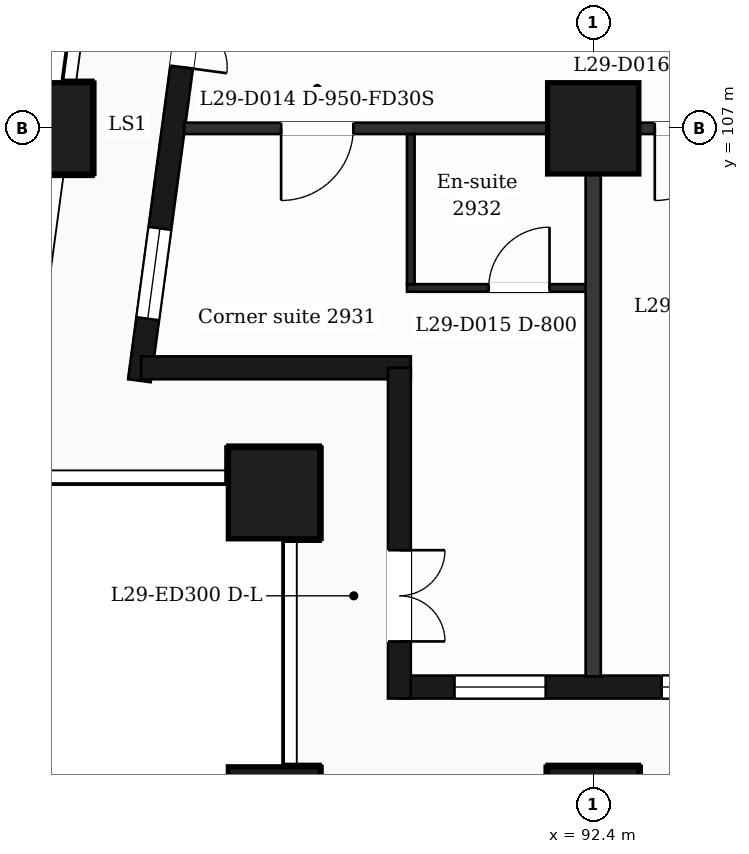
"""IFC4 building model, lengths in metres.
Left out: names, types, materials, properties, quantities, classifications, styles, units other than length and angle.
Written with IfcOpenShell. Run it as: python <this file> out.ifc"""

import sys

from ifc_helpers import new_model, si_unit, direction, frame, frame_2d, origin, origin_2d, place, context, subcontext, project, spatial, rectangle, extrude, element, fill, save


model = new_model("IFC4")
c1 = context("Model", 3, precision=1e-05, world=origin(), true_north=direction((0.0, 1.0)))
c2 = subcontext(c1, "Body", "Model", "MODEL_VIEW")
j1 = project(units=[si_unit("LENGTHUNIT", "METRE"), si_unit("PLANEANGLEUNIT", "RADIAN")], contexts=[c1])
p1 = place(None, origin())
s1 = spatial("IfcSite", under=j1, at=p1, CompositionType="ELEMENT")
p2 = place(p1, origin())
s2 = spatial("IfcBuilding", under=s1, at=p2, CompositionType="ELEMENT")
p3 = place(p2, frame((0.0, 0.0, 124.3)))
s3 = spatial("IfcBuildingStorey", under=s2, at=p3, CompositionType="ELEMENT", Elevation=124.3)
for number, where, z_axis, x_axis in (
    (1, (92.4, 98.0, 0.0), (0.0, 0.0, 1.0), (1.0, 0.0, 0.0)),
    (2, (88.2, 98.0, 0.0), (0.0, 0.0, 1.0), (1.0, 0.0, 0.0)),
    (3, (88.2, 102.2, 0.0), (0.0, 0.0, 1.0), (1.0, 0.0, 0.0)),
    (4, (92.4, 107.0, 0.0), (0.0, 0.0, 1.0), (1.0, 0.0, 0.0)),
    (5, (85.211, 107.0, 0.0), (0.0, 0.0, 1.0), (1.0, 0.0, 0.0)),
):
    element("IfcColumn", number, at=place(p3, frame(where, z_axis=z_axis, x_axis=x_axis)), inside=s3, PredefinedType="COLUMN", context=c2, shape_type="SweptSolid", body=[
        extrude(rectangle(XDim=1.2, YDim=1.2, at=origin_2d()), origin(), (0.0, 0.0, 1.0), 3.7),
    ])
p4 = place(p3, frame((89.85, 99.65, 0.0), z_axis=(0.0, 0.0, 1.0), x_axis=(1.0, 0.0, 0.0)))
e6 = element("IfcWall", 6, at=p4, inside=s3, PredefinedType="SOLIDWALL", context=c2, shape_type="SweptSolid", body=[
    extrude(rectangle(XDim=47.25, YDim=0.3, at=frame_2d((23.625, 0.0))), origin(), (0.0, 0.0, 1.0), 3.38),
])
p5 = place(p4, frame((0.725, 0.0, 0.9)))
e7 = element("IfcOpeningElement", 7, at=p5, cuts=e6, PredefinedType="OPENING", context=c2, shape_type="SweptSolid", body=[
    extrude(rectangle(XDim=1.2, YDim=2.1, at=frame_2d((0.6, 1.05))), frame((0.0, 0.16, 0.0), z_axis=(0.0, -1.0, 0.0), x_axis=(1.0, 0.0, 0.0)), (0.0, 0.0, 1.0), 0.32),
])
p6 = place(p4, frame((3.45, 0.0, 0.9)))
e8 = element("IfcOpeningElement", 8, at=p6, cuts=e6, PredefinedType="OPENING", context=c2, shape_type="SweptSolid", body=[
    extrude(rectangle(XDim=2.4, YDim=2.1, at=frame_2d((1.2, 1.05))), frame((0.0, 0.16, 0.0), z_axis=(0.0, -1.0, 0.0), x_axis=(1.0, 0.0, 0.0)), (0.0, 0.0, 1.0), 0.32),
])
p7 = place(p4, frame((7.65, 0.0, 0.9)))
e9 = element("IfcOpeningElement", 9, at=p7, cuts=e6, PredefinedType="OPENING", context=c2, shape_type="SweptSolid", body=[
    extrude(rectangle(XDim=2.4, YDim=2.1, at=frame_2d((1.2, 1.05))), frame((0.0, 0.16, 0.0), z_axis=(0.0, -1.0, 0.0), x_axis=(1.0, 0.0, 0.0)), (0.0, 0.0, 1.0), 0.32),
])
p8 = place(p4, frame((11.85, 0.0, 0.9)))
e10 = element("IfcOpeningElement", 10, at=p8, cuts=e6, PredefinedType="OPENING", context=c2, shape_type="SweptSolid", body=[
    extrude(rectangle(XDim=2.4, YDim=2.1, at=frame_2d((1.2, 1.05))), frame((0.0, 0.16, 0.0), z_axis=(0.0, -1.0, 0.0), x_axis=(1.0, 0.0, 0.0)), (0.0, 0.0, 1.0), 0.32),
])
p9 = place(p4, frame((16.05, 0.0, 0.9)))
e11 = element("IfcOpeningElement", 11, at=p9, cuts=e6, PredefinedType="OPENING", context=c2, shape_type="SweptSolid", body=[
    extrude(rectangle(XDim=2.4, YDim=2.1, at=frame_2d((1.2, 1.05))), frame((0.0, 0.16, 0.0), z_axis=(0.0, -1.0, 0.0), x_axis=(1.0, 0.0, 0.0)), (0.0, 0.0, 1.0), 0.32),
])
p10 = place(p4, frame((20.25, 0.0, 0.9)))
e12 = element("IfcOpeningElement", 12, at=p10, cuts=e6, PredefinedType="OPENING", context=c2, shape_type="SweptSolid", body=[
    extrude(rectangle(XDim=2.4, YDim=2.1, at=frame_2d((1.2, 1.05))), frame((0.0, 0.16, 0.0), z_axis=(0.0, -1.0, 0.0), x_axis=(1.0, 0.0, 0.0)), (0.0, 0.0, 1.0), 0.32),
])
p11 = place(p4, frame((25.05, 0.0, 0.9)))
e13 = element("IfcOpeningElement", 13, at=p11, cuts=e6, PredefinedType="OPENING", context=c2, shape_type="SweptSolid", body=[
    extrude(rectangle(XDim=1.2, YDim=2.1, at=frame_2d((0.6, 1.05))), frame((0.0, 0.16, 0.0), z_axis=(0.0, -1.0, 0.0), x_axis=(1.0, 0.0, 0.0)), (0.0, 0.0, 1.0), 0.32),
])
p12 = place(p4, frame((29.25, 0.0, 0.9)))
e14 = element("IfcOpeningElement", 14, at=p12, cuts=e6, PredefinedType="OPENING", context=c2, shape_type="SweptSolid", body=[
    extrude(rectangle(XDim=1.2, YDim=2.1, at=frame_2d((0.6, 1.05))), frame((0.0, 0.16, 0.0), z_axis=(0.0, -1.0, 0.0), x_axis=(1.0, 0.0, 0.0)), (0.0, 0.0, 1.0), 0.32),
])
p13 = place(p4, frame((32.55, 0.0, 0.0)))
e15 = element("IfcOpeningElement", 15, at=p13, cuts=e6, PredefinedType="OPENING", context=c2, shape_type="SweptSolid", body=[
    extrude(rectangle(XDim=1.2, YDim=2.4, at=frame_2d((0.6, 1.2))), frame((0.0, 0.16, 0.0), z_axis=(0.0, -1.0, 0.0), x_axis=(1.0, 0.0, 0.0)), (0.0, 0.0, 1.0), 0.32),
])
p14 = place(p4, frame((34.35, 0.0, 0.9)))
e16 = element("IfcOpeningElement", 16, at=p14, cuts=e6, PredefinedType="OPENING", context=c2, shape_type="SweptSolid", body=[
    extrude(rectangle(XDim=1.2, YDim=2.1, at=frame_2d((0.6, 1.05))), frame((0.0, 0.16, 0.0), z_axis=(0.0, -1.0, 0.0), x_axis=(1.0, 0.0, 0.0)), (0.0, 0.0, 1.0), 0.32),
])
p15 = place(p4, frame((37.05, 0.0, 0.9)))
e17 = element("IfcOpeningElement", 17, at=p15, cuts=e6, PredefinedType="OPENING", context=c2, shape_type="SweptSolid", body=[
    extrude(rectangle(XDim=2.4, YDim=2.1, at=frame_2d((1.2, 1.05))), frame((0.0, 0.16, 0.0), z_axis=(0.0, -1.0, 0.0), x_axis=(1.0, 0.0, 0.0)), (0.0, 0.0, 1.0), 0.32),
])
p16 = place(p4, frame((40.95, 0.0, 0.0)))
e18 = element("IfcOpeningElement", 18, at=p16, cuts=e6, PredefinedType="OPENING", context=c2, shape_type="SweptSolid", body=[
    extrude(rectangle(XDim=1.2, YDim=2.4, at=frame_2d((0.6, 1.2))), frame((0.0, 0.16, 0.0), z_axis=(0.0, -1.0, 0.0), x_axis=(1.0, 0.0, 0.0)), (0.0, 0.0, 1.0), 0.32),
])
p17 = place(p4, frame((42.75, 0.0, 0.9)))
e19 = element("IfcOpeningElement", 19, at=p17, cuts=e6, PredefinedType="OPENING", context=c2, shape_type="SweptSolid", body=[
    extrude(rectangle(XDim=1.2, YDim=2.1, at=frame_2d((0.6, 1.05))), frame((0.0, 0.16, 0.0), z_axis=(0.0, -1.0, 0.0), x_axis=(1.0, 0.0, 0.0)), (0.0, 0.0, 1.0), 0.32),
])
p18 = place(p4, frame((45.25, 0.0, 0.9)))
e20 = element("IfcOpeningElement", 20, at=p18, cuts=e6, PredefinedType="OPENING", context=c2, shape_type="SweptSolid", body=[
    extrude(rectangle(XDim=1.2, YDim=2.1, at=frame_2d((0.6, 1.05))), frame((0.0, 0.16, 0.0), z_axis=(0.0, -1.0, 0.0), x_axis=(1.0, 0.0, 0.0)), (0.0, 0.0, 1.0), 0.32),
])
p19 = place(p3, frame((87.334, 110.4, 0.0), z_axis=(0.0, 0.0, 1.0), x_axis=(-0.133437175554, -0.991057273915, 0.0)))
e21 = element("IfcWall", 21, at=p19, inside=s3, PredefinedType="SOLIDWALL", context=c2, shape_type="SweptSolid", body=[
    extrude(rectangle(XDim=6.781, YDim=0.3, at=frame_2d((3.39, 0.0))), origin(), (0.0, 0.0, 1.0), 3.38),
])
p20 = place(p19, frame((1.418, 0.0, 0.0)))
e22 = element("IfcOpeningElement", 22, at=p20, cuts=e21, PredefinedType="OPENING", context=c2, shape_type="SweptSolid", body=[
    extrude(rectangle(XDim=1.2, YDim=2.4, at=frame_2d((0.6, 1.2))), frame((0.0, 0.16, 0.0), z_axis=(0.0, -1.0, 0.0), x_axis=(1.0, 0.0, 0.0)), (0.0, 0.0, 1.0), 0.32),
])
p21 = place(p19, frame((4.758, 0.0, 0.9)))
e23 = element("IfcOpeningElement", 23, at=p21, cuts=e21, PredefinedType="OPENING", context=c2, shape_type="SweptSolid", body=[
    extrude(rectangle(XDim=1.2, YDim=2.1, at=frame_2d((0.6, 1.05))), frame((0.0, 0.16, 0.0), z_axis=(0.0, -1.0, 0.0), x_axis=(1.0, 0.0, 0.0)), (0.0, 0.0, 1.0), 0.32),
])
p22 = place(p3, frame((86.452, 103.85, 0.0), z_axis=(0.0, 0.0, 1.0), x_axis=(1.0, 0.0, 0.0)))
e24 = element("IfcWall", 24, at=p22, inside=s3, PredefinedType="SOLIDWALL", context=c2, shape_type="SweptSolid", body=[
    extrude(rectangle(XDim=3.548, YDim=0.3, at=frame_2d((1.774, 0.0))), origin(), (0.0, 0.0, 1.0), 3.38),
])
p23 = place(p3, frame((89.85, 103.85, 0.0), z_axis=(0.0, 0.0, 1.0), x_axis=(0.0, -1.0, 0.0)))
e25 = element("IfcWall", 25, at=p23, inside=s3, PredefinedType="SOLIDWALL", context=c2, shape_type="SweptSolid", body=[
    extrude(rectangle(XDim=4.35, YDim=0.3, at=frame_2d((2.175, 0.0))), origin(), (0.0, 0.0, 1.0), 3.38),
])
p24 = place(p23, frame((2.4, 0.0, 0.0)))
e26 = element("IfcOpeningElement", 26, at=p24, cuts=e25, PredefinedType="OPENING", context=c2, shape_type="SweptSolid", body=[
    extrude(rectangle(XDim=1.2, YDim=2.4, at=frame_2d((0.6, 1.2))), frame((0.0, 0.16, 0.0), z_axis=(0.0, -1.0, 0.0), x_axis=(1.0, 0.0, 0.0)), (0.0, 0.0, 1.0), 0.32),
])
p25 = place(p3, frame((89.95, 104.9, 0.0), z_axis=(0.0, 0.0, 1.0), x_axis=(1.0, 0.0, 0.0)))
e27 = element("IfcWall", 27, at=p25, inside=s3, PredefinedType="PARTITIONING", context=c2, shape_type="SweptSolid", body=[
    extrude(rectangle(XDim=2.45, YDim=0.1, at=frame_2d((1.225, 0.0))), origin(), (0.0, 0.0, 1.0), 3.38),
])
p26 = place(p25, frame((1.075, 0.0, 0.0)))
e28 = element("IfcOpeningElement", 28, at=p26, cuts=e27, PredefinedType="OPENING", context=c2, shape_type="SweptSolid", body=[
    extrude(rectangle(XDim=0.8, YDim=2.1, at=frame_2d((0.4, 1.05))), frame((0.0, 0.06, 0.0), z_axis=(0.0, -1.0, 0.0), x_axis=(1.0, 0.0, 0.0)), (0.0, 0.0, 1.0), 0.12),
])
p27 = place(p3, frame((87.018, 107.0, 0.0), z_axis=(0.0, 0.0, 1.0), x_axis=(1.0, 0.0, 0.0)))
e29 = element("IfcWall", 29, at=p27, inside=s3, PredefinedType="PARTITIONING", context=c2, shape_type="SweptSolid", body=[
    extrude(rectangle(XDim=52.765, YDim=0.15, at=frame_2d((26.382, 0.0))), origin(), (0.0, 0.0, 1.0), 3.38),
])
p28 = place(p27, frame((1.276, 0.0, 0.0)))
e30 = element("IfcOpeningElement", 30, at=p28, cuts=e29, PredefinedType="OPENING", context=c2, shape_type="SweptSolid", body=[
    extrude(rectangle(XDim=0.95, YDim=2.1, at=frame_2d((0.475, 1.05))), frame((0.0, 0.085, 0.0), z_axis=(0.0, -1.0, 0.0), x_axis=(1.0, 0.0, 0.0)), (0.0, 0.0, 1.0), 0.17),
])
p29 = place(p27, frame((6.192, 0.0, 0.0)))
e31 = element("IfcOpeningElement", 31, at=p29, cuts=e29, PredefinedType="OPENING", context=c2, shape_type="SweptSolid", body=[
    extrude(rectangle(XDim=0.95, YDim=2.1, at=frame_2d((0.475, 1.05))), frame((0.0, 0.085, 0.0), z_axis=(0.0, -1.0, 0.0), x_axis=(1.0, 0.0, 0.0)), (0.0, 0.0, 1.0), 0.17),
])
p30 = place(p27, frame((11.982, 0.0, 0.0)))
e32 = element("IfcOpeningElement", 32, at=p30, cuts=e29, PredefinedType="OPENING", context=c2, shape_type="SweptSolid", body=[
    extrude(rectangle(XDim=1.0, YDim=2.1, at=frame_2d((0.5, 1.05))), frame((0.0, 0.085, 0.0), z_axis=(0.0, -1.0, 0.0), x_axis=(1.0, 0.0, 0.0)), (0.0, 0.0, 1.0), 0.17),
])
p31 = place(p27, frame((14.582, 0.0, 0.0)))
e33 = element("IfcOpeningElement", 33, at=p31, cuts=e29, PredefinedType="OPENING", context=c2, shape_type="SweptSolid", body=[
    extrude(rectangle(XDim=0.95, YDim=2.1, at=frame_2d((0.475, 1.05))), frame((0.0, 0.085, 0.0), z_axis=(0.0, -1.0, 0.0), x_axis=(1.0, 0.0, 0.0)), (0.0, 0.0, 1.0), 0.17),
])
p32 = place(p27, frame((18.257, 0.0, 0.0)))
e34 = element("IfcOpeningElement", 34, at=p32, cuts=e29, PredefinedType="OPENING", context=c2, shape_type="SweptSolid", body=[
    extrude(rectangle(XDim=0.95, YDim=2.1, at=frame_2d((0.475, 1.05))), frame((0.0, 0.085, 0.0), z_axis=(0.0, -1.0, 0.0), x_axis=(1.0, 0.0, 0.0)), (0.0, 0.0, 1.0), 0.17),
])
p33 = place(p27, frame((22.992, 0.0, 0.0)))
e35 = element("IfcOpeningElement", 35, at=p33, cuts=e29, PredefinedType="OPENING", context=c2, shape_type="SweptSolid", body=[
    extrude(rectangle(XDim=0.95, YDim=2.1, at=frame_2d((0.475, 1.05))), frame((0.0, 0.085, 0.0), z_axis=(0.0, -1.0, 0.0), x_axis=(1.0, 0.0, 0.0)), (0.0, 0.0, 1.0), 0.17),
])
p34 = place(p27, frame((26.632, 0.0, 0.0)))
e36 = element("IfcOpeningElement", 36, at=p34, cuts=e29, PredefinedType="OPENING", context=c2, shape_type="SweptSolid", body=[
    extrude(rectangle(XDim=1.0, YDim=2.1, at=frame_2d((0.5, 1.05))), frame((0.0, 0.085, 0.0), z_axis=(0.0, -1.0, 0.0), x_axis=(1.0, 0.0, 0.0)), (0.0, 0.0, 1.0), 0.17),
])
p35 = place(p27, frame((33.557, 0.0, 0.0)))
e37 = element("IfcOpeningElement", 37, at=p35, cuts=e29, PredefinedType="OPENING", context=c2, shape_type="SweptSolid", body=[
    extrude(rectangle(XDim=0.95, YDim=2.1, at=frame_2d((0.475, 1.05))), frame((0.0, 0.085, 0.0), z_axis=(0.0, -1.0, 0.0), x_axis=(1.0, 0.0, 0.0)), (0.0, 0.0, 1.0), 0.17),
])
p36 = place(p27, frame((37.182, 0.0, 0.0)))
e38 = element("IfcOpeningElement", 38, at=p36, cuts=e29, PredefinedType="OPENING", context=c2, shape_type="SweptSolid", body=[
    extrude(rectangle(XDim=0.95, YDim=2.1, at=frame_2d((0.475, 1.05))), frame((0.0, 0.085, 0.0), z_axis=(0.0, -1.0, 0.0), x_axis=(1.0, 0.0, 0.0)), (0.0, 0.0, 1.0), 0.17),
])
p37 = place(p27, frame((41.957, 0.0, 0.0)))
e39 = element("IfcOpeningElement", 39, at=p37, cuts=e29, PredefinedType="OPENING", context=c2, shape_type="SweptSolid", body=[
    extrude(rectangle(XDim=0.95, YDim=2.1, at=frame_2d((0.475, 1.05))), frame((0.0, 0.085, 0.0), z_axis=(0.0, -1.0, 0.0), x_axis=(1.0, 0.0, 0.0)), (0.0, 0.0, 1.0), 0.17),
])
p38 = place(p27, frame((45.622, 0.0, 0.0)))
e40 = element("IfcOpeningElement", 40, at=p38, cuts=e29, PredefinedType="OPENING", context=c2, shape_type="SweptSolid", body=[
    extrude(rectangle(XDim=0.95, YDim=2.1, at=frame_2d((0.475, 1.05))), frame((0.0, 0.085, 0.0), z_axis=(0.0, -1.0, 0.0), x_axis=(1.0, 0.0, 0.0)), (0.0, 0.0, 1.0), 0.17),
])
p39 = place(p27, frame((48.56, 0.0, 0.0)))
e41 = element("IfcOpeningElement", 41, at=p39, cuts=e29, PredefinedType="OPENING", context=c2, shape_type="SweptSolid", body=[
    extrude(rectangle(XDim=0.95, YDim=2.1, at=frame_2d((0.475, 1.05))), frame((0.0, 0.085, 0.0), z_axis=(0.0, -1.0, 0.0), x_axis=(1.0, 0.0, 0.0)), (0.0, 0.0, 1.0), 0.17),
])
p40 = place(p3, frame((90.0, 104.95, 0.0), z_axis=(0.0, 0.0, 1.0), x_axis=(0.0, 1.0, 0.0)))
e42 = element("IfcWall", 42, at=p40, inside=s3, PredefinedType="PARTITIONING", context=c2, shape_type="SweptSolid", body=[
    extrude(rectangle(XDim=1.975, YDim=0.1, at=frame_2d((0.988, 0.0))), origin(), (0.0, 0.0, 1.0), 3.38),
])
p41 = place(p3, frame((92.4, 99.79, 0.0), z_axis=(0.0, 0.0, 1.0), x_axis=(0.0, 1.0, 0.0)))
e43 = element("IfcWall", 43, at=p41, inside=s3, PredefinedType="PARTITIONING", context=c2, shape_type="SweptSolid", body=[
    extrude(rectangle(XDim=7.135, YDim=0.2, at=frame_2d((3.567, 0.0))), origin(), (0.0, 0.0, 1.0), 3.38),
])
p42 = place(p5, origin())
e44 = element("IfcWindow", 44, at=p42, inside=s3, PartitioningType="SINGLE_PANEL", PredefinedType="WINDOW", context=c2, shape_type="SweptSolid", body=[
    extrude(rectangle(XDim=1.2, YDim=2.1, at=frame_2d((0.6, 1.05))), frame((0.0, 0.03, 0.0), z_axis=(0.0, -1.0, 0.0), x_axis=(1.0, 0.0, 0.0)), (0.0, 0.0, 1.0), 0.06),
])
fill(e7, e44)
p43 = place(p6, origin())
e45 = element("IfcWindow", 45, at=p43, inside=s3, PartitioningType="SINGLE_PANEL", PredefinedType="WINDOW", context=c2, shape_type="SweptSolid", body=[
    extrude(rectangle(XDim=2.4, YDim=2.1, at=frame_2d((1.2, 1.05))), frame((0.0, 0.03, 0.0), z_axis=(0.0, -1.0, 0.0), x_axis=(1.0, 0.0, 0.0)), (0.0, 0.0, 1.0), 0.06),
])
fill(e8, e45)
p44 = place(p20, origin())
e46 = element("IfcDoor", 46, at=p44, inside=s3, OperationType="DOUBLE_DOOR_SINGLE_SWING", PredefinedType="DOOR", context=c2, shape_type="SweptSolid", body=[
    extrude(rectangle(XDim=1.2, YDim=2.4, at=frame_2d((0.6, 1.2))), frame((0.0, 0.025, 0.0), z_axis=(0.0, -1.0, 0.0), x_axis=(1.0, 0.0, 0.0)), (0.0, 0.0, 1.0), 0.05),
])
fill(e22, e46)
p45 = place(p21, origin())
e47 = element("IfcWindow", 47, at=p45, inside=s3, PartitioningType="SINGLE_PANEL", PredefinedType="WINDOW", context=c2, shape_type="SweptSolid", body=[
    extrude(rectangle(XDim=1.2, YDim=2.1, at=frame_2d((0.6, 1.05))), frame((0.0, 0.03, 0.0), z_axis=(0.0, -1.0, 0.0), x_axis=(1.0, 0.0, 0.0)), (0.0, 0.0, 1.0), 0.06),
])
fill(e23, e47)
p46 = place(p24, origin())
e48 = element("IfcDoor", 48, at=p46, inside=s3, OperationType="DOUBLE_DOOR_SINGLE_SWING", PredefinedType="DOOR", context=c2, shape_type="SweptSolid", body=[
    extrude(rectangle(XDim=1.2, YDim=2.4, at=frame_2d((0.6, 1.2))), frame((0.0, 0.025, 0.0), z_axis=(0.0, -1.0, 0.0), x_axis=(1.0, 0.0, 0.0)), (0.0, 0.0, 1.0), 0.05),
])
fill(e26, e48)
p47 = place(p28, origin())
e49 = element("IfcDoor", 49, at=p47, inside=s3, OperationType="SINGLE_SWING_LEFT", PredefinedType="DOOR", context=c2, shape_type="SweptSolid", body=[
    extrude(rectangle(XDim=0.95, YDim=2.1, at=frame_2d((0.475, 1.05))), frame((0.0, 0.025, 0.0), z_axis=(0.0, -1.0, 0.0), x_axis=(1.0, 0.0, 0.0)), (0.0, 0.0, 1.0), 0.05),
])
fill(e30, e49)
p48 = place(p26, origin())
e50 = element("IfcDoor", 50, at=p48, inside=s3, OperationType="SINGLE_SWING_RIGHT", PredefinedType="DOOR", context=c2, shape_type="SweptSolid", body=[
    extrude(rectangle(XDim=0.8, YDim=2.1, at=frame_2d((0.4, 1.05))), frame((0.0, 0.025, 0.0), z_axis=(0.0, -1.0, 0.0), x_axis=(1.0, 0.0, 0.0)), (0.0, 0.0, 1.0), 0.05),
])
fill(e28, e50)
p49 = place(p29, origin())
e51 = element("IfcDoor", 51, at=p49, inside=s3, OperationType="SINGLE_SWING_LEFT", PredefinedType="DOOR", context=c2, shape_type="SweptSolid", body=[
    extrude(rectangle(XDim=0.95, YDim=2.1, at=frame_2d((0.475, 1.05))), frame((0.0, 0.025, 0.0), z_axis=(0.0, -1.0, 0.0), x_axis=(1.0, 0.0, 0.0)), (0.0, 0.0, 1.0), 0.05),
])
fill(e31, e51)
save(model, sys.argv[1])
